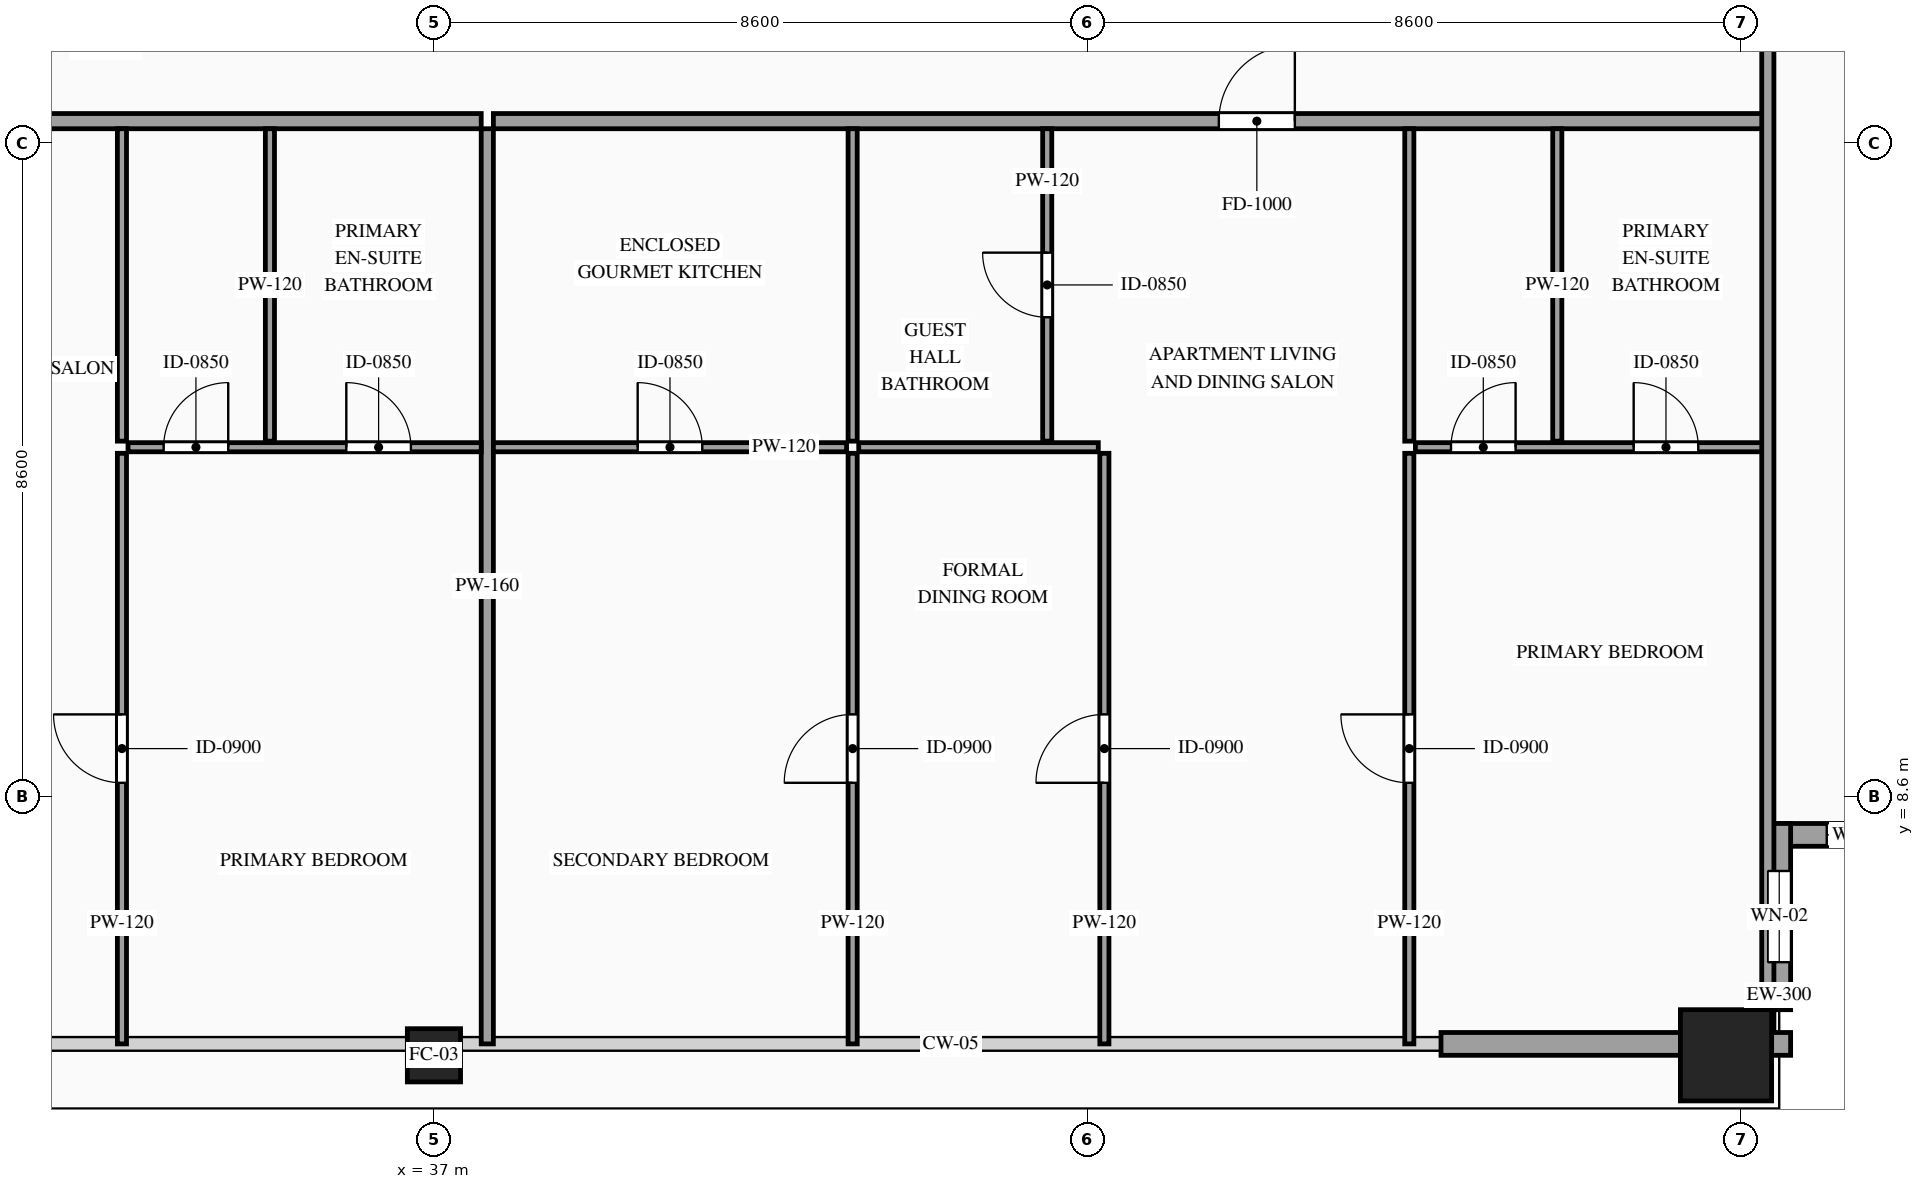
"""IFC4 building model, lengths in metres.
Left out: names, types, materials, properties, quantities, classifications, styles, units other than length and angle.
Written with IfcOpenShell. Run it as: python <this file> out.ifc"""

import sys

from ifc_helpers import new_model, si_unit, direction, frame, frame_2d, origin, origin_2d, place, context, subcontext, project, spatial, rectangle, hollow_rectangle, extrude, source, transform, mapped, element, fill, save


model = new_model("IFC4")
c1 = context("Model", 3, precision=1e-05, world=origin(), true_north=direction((0.0, 1.0)))
c2 = subcontext(c1, "Body", "Model", "MODEL_VIEW")
j1 = project(units=[si_unit("LENGTHUNIT", "METRE"), si_unit("PLANEANGLEUNIT", "RADIAN")], contexts=[c1])
p1 = place(None, origin())
s1 = spatial("IfcSite", under=j1, at=p1, CompositionType="ELEMENT")
p2 = place(p1, origin())
s2 = spatial("IfcBuilding", under=s1, at=p2, CompositionType="ELEMENT")
p3 = place(p2, frame((0.0, 0.0, 231.1)))
s3 = spatial("IfcBuildingStorey", under=s2, at=p3, CompositionType="ELEMENT", Elevation=231.1)
m1 = source(origin(), c2, "Body", "SweptSolid", [
    extrude(hollow_rectangle(XDim=0.7, YDim=0.7, WallThickness=0.032, at=origin_2d()), origin(), (0.0, 0.0, 1.0), 3.5),
])
p4 = place(p3, frame((37.0, 5.2, 0.0), z_axis=(0.0, 0.0, 1.0), x_axis=(1.0, 0.0, 0.0)))
e1 = element("IfcColumn", 1, at=p4, inside=s3, PredefinedType="COLUMN", context=c2, shape_type="MappedRepresentation", body=[
    mapped(m1, transform((0.0, 0.0, 0.0), scale=1.0)),
])
m2 = source(origin(), c2, "Body", "SweptSolid", [
    extrude(hollow_rectangle(XDim=1.2, YDim=1.2, WallThickness=0.055, at=origin_2d()), origin(), (0.0, 0.0, 1.0), 3.5),
])
p5 = place(p3, frame((54.0, 5.2, 0.0), z_axis=(0.0, 0.0, 1.0), x_axis=(1.0, 0.0, 0.0)))
e2 = element("IfcColumn", 2, at=p5, inside=s3, PredefinedType="COLUMN", context=c2, shape_type="MappedRepresentation", body=[
    mapped(m2, transform((0.0, 0.0, 0.0), scale=1.0)),
])
p6 = place(p3, frame((54.55, 8.1, 0.0), z_axis=(0.0, 0.0, 1.0), x_axis=(1.0, 0.0, 0.0)))
e3 = element("IfcWall", 3, at=p6, inside=s3, PredefinedType="SOLIDWALL", context=c2, shape_type="SweptSolid", body=[
    extrude(rectangle(XDim=2.45, YDim=0.3, at=frame_2d((1.225, 0.0))), origin(), (0.0, 0.0, 1.0), 3.28),
])
p7 = place(p6, frame((0.775, 0.0, 0.85)))
e4 = element("IfcOpeningElement", 4, at=p7, cuts=e3, PredefinedType="OPENING", context=c2, shape_type="SweptSolid", body=[
    extrude(rectangle(XDim=0.9, YDim=1.5, at=frame_2d((0.45, 0.75))), frame((0.0, 0.165, 0.0), z_axis=(0.0, -1.0, 0.0), x_axis=(1.0, 0.0, 0.0)), (0.0, 0.0, 1.0), 0.33),
])
p8 = place(p3, frame((54.7, 5.8, 0.0), z_axis=(0.0, 0.0, 1.0), x_axis=(0.0, 1.0, 0.0)))
e5 = element("IfcWall", 5, at=p8, inside=s3, PredefinedType="SOLIDWALL", context=c2, shape_type="SweptSolid", body=[
    extrude(rectangle(XDim=2.45, YDim=0.3, at=frame_2d((1.225, 0.0))), origin(), (0.0, 0.0, 1.0), 3.28),
])
p9 = place(p8, frame((0.625, 0.0, 0.85)))
e6 = element("IfcOpeningElement", 6, at=p9, cuts=e5, PredefinedType="OPENING", context=c2, shape_type="SweptSolid", body=[
    extrude(rectangle(XDim=1.2, YDim=2.1, at=frame_2d((0.6, 1.05))), frame((0.0, 0.165, 0.0), z_axis=(0.0, -1.0, 0.0), x_axis=(1.0, 0.0, 0.0)), (0.0, 0.0, 1.0), 0.33),
])
m3 = source(origin(), c2, "Body", "SweptSolid", [
    extrude(rectangle(XDim=0.25, YDim=0.3, at=frame_2d((0.125, 0.0))), origin(), (0.0, 0.0, 1.0), 3.28),
])
p10 = place(p3, frame((54.6, 5.35, 0.0), z_axis=(0.0, 0.0, 1.0), x_axis=(1.0, 0.0, 0.0)))
e7 = element("IfcWall", 7, at=p10, inside=s3, PredefinedType="SOLIDWALL", context=c2, shape_type="MappedRepresentation", body=[
    mapped(m3, transform((0.0, 0.0, 0.0), scale=1.0)),
])
m4 = source(origin(), c2, "Body", "SweptSolid", [
    extrude(rectangle(XDim=3.15, YDim=0.3, at=frame_2d((1.575, 0.0))), origin(), (0.0, 0.0, 1.0), 2.835),
])
p11 = place(p3, frame((50.25, 5.35, 0.0), z_axis=(0.0, 0.0, 1.0), x_axis=(1.0, 0.0, 0.0)))
e8 = element("IfcWall", 8, at=p11, inside=s3, PredefinedType="SOLIDWALL", context=c2, shape_type="MappedRepresentation", body=[
    mapped(m4, transform((0.0, 0.0, 0.0), scale=1.0)),
])
p12 = place(p3, frame((19.44, 17.49, 0.0), z_axis=(0.0, 0.0, 1.0), x_axis=(1.0, 0.0, 0.0)))
e9 = element("IfcWall", 9, at=p12, inside=s3, PredefinedType="PARTITIONING", context=c2, shape_type="SweptSolid", body=[
    extrude(rectangle(XDim=18.182, YDim=0.2, at=frame_2d((9.091, 0.0))), origin(), (0.0, 0.0, 1.0), 3.28),
])
p13 = place(p12, frame((10.528, 0.0, 0.0)))
e10 = element("IfcOpeningElement", 10, at=p13, cuts=e9, PredefinedType="OPENING", context=c2, shape_type="SweptSolid", body=[
    extrude(rectangle(XDim=1.0, YDim=2.2, at=frame_2d((0.5, 1.1))), frame((0.0, 0.115, 0.0), z_axis=(0.0, -1.0, 0.0), x_axis=(1.0, 0.0, 0.0)), (0.0, 0.0, 1.0), 0.23),
])
m5 = source(origin(), c2, "Body", "SweptSolid", [
    extrude(rectangle(XDim=12.04, YDim=0.16, at=frame_2d((6.02, 0.0))), origin(), (0.0, 0.0, 1.0), 3.28),
])
p14 = place(p3, frame((37.702, 5.35, 0.0), z_axis=(0.0, 0.0, 1.0), x_axis=(0.0, 1.0, 0.0)))
e11 = element("IfcWall", 11, at=p14, inside=s3, PredefinedType="PARTITIONING", context=c2, shape_type="MappedRepresentation", body=[
    mapped(m5, transform((0.0, 0.0, 0.0), scale=1.0)),
])
m6 = source(origin(), c2, "Body", "SweptSolid", [
    extrude(rectangle(XDim=4.11, YDim=0.12, at=frame_2d((2.055, 0.0))), origin(), (0.0, 0.0, 1.0), 3.28),
])
for number, where, z_axis, x_axis in (
    (12, (34.842, 13.28, 0.0), (0.0, 0.0, 1.0), (0.0, 1.0, 0.0)),
    (13, (32.895, 13.28, 0.0), (0.0, 0.0, 1.0), (0.0, 1.0, 0.0)),
):
    element("IfcWall", number, at=place(p3, frame(where, z_axis=z_axis, x_axis=x_axis)), inside=s3, PredefinedType="PARTITIONING", context=c2, shape_type="MappedRepresentation", body=[
        mapped(m6, transform((0.0, 0.0, 0.0), scale=1.0)),
    ])
p15 = place(p3, frame((32.975, 13.2, 0.0), z_axis=(0.0, 0.0, 1.0), x_axis=(1.0, 0.0, 0.0)))
e14 = element("IfcWall", 14, at=p15, inside=s3, PredefinedType="PARTITIONING", context=c2, shape_type="SweptSolid", body=[
    extrude(rectangle(XDim=4.647, YDim=0.12, at=frame_2d((2.323, 0.0))), origin(), (0.0, 0.0, 1.0), 3.28),
])
p16 = place(p15, frame((2.872, 0.0, 0.0)))
e15 = element("IfcOpeningElement", 15, at=p16, cuts=e14, PredefinedType="OPENING", context=c2, shape_type="SweptSolid", body=[
    extrude(rectangle(XDim=0.85, YDim=2.1, at=frame_2d((0.425, 1.05))), frame((0.0, 0.075, 0.0), z_axis=(0.0, -1.0, 0.0), x_axis=(1.0, 0.0, 0.0)), (0.0, 0.0, 1.0), 0.15),
])
p17 = place(p15, frame((0.469, 0.0, 0.0)))
e16 = element("IfcOpeningElement", 16, at=p17, cuts=e14, PredefinedType="OPENING", context=c2, shape_type="SweptSolid", body=[
    extrude(rectangle(XDim=0.85, YDim=2.1, at=frame_2d((0.425, 1.05))), frame((0.0, 0.075, 0.0), z_axis=(0.0, -1.0, 0.0), x_axis=(1.0, 0.0, 0.0)), (0.0, 0.0, 1.0), 0.15),
])
p18 = place(p3, frame((32.895, 5.35, 0.0), z_axis=(0.0, 0.0, 1.0), x_axis=(0.0, 1.0, 0.0)))
e17 = element("IfcWall", 17, at=p18, inside=s3, PredefinedType="PARTITIONING", context=c2, shape_type="SweptSolid", body=[
    extrude(rectangle(XDim=7.77, YDim=0.12, at=frame_2d((3.885, 0.0))), origin(), (0.0, 0.0, 1.0), 3.28),
])
p19 = place(p18, frame((3.435, 0.0, 0.0)))
e18 = element("IfcOpeningElement", 18, at=p19, cuts=e17, PredefinedType="OPENING", context=c2, shape_type="SweptSolid", body=[
    extrude(rectangle(XDim=0.9, YDim=2.15, at=frame_2d((0.45, 1.075))), frame((0.0, 0.075, 0.0), z_axis=(0.0, -1.0, 0.0), x_axis=(1.0, 0.0, 0.0)), (0.0, 0.0, 1.0), 0.15),
])
p20 = place(p3, frame((37.782, 17.49, 0.0), z_axis=(0.0, 0.0, 1.0), x_axis=(1.0, 0.0, 0.0)))
e19 = element("IfcWall", 19, at=p20, inside=s3, PredefinedType="PARTITIONING", context=c2, shape_type="SweptSolid", body=[
    extrude(rectangle(XDim=16.778, YDim=0.2, at=frame_2d((8.389, 0.0))), origin(), (0.0, 0.0, 1.0), 3.28),
])
p21 = place(p20, frame((9.545, 0.0, 0.0)))
e20 = element("IfcOpeningElement", 20, at=p21, cuts=e19, PredefinedType="OPENING", context=c2, shape_type="SweptSolid", body=[
    extrude(rectangle(XDim=1.0, YDim=2.2, at=frame_2d((0.5, 1.1))), frame((0.0, 0.115, 0.0), z_axis=(0.0, -1.0, 0.0), x_axis=(1.0, 0.0, 0.0)), (0.0, 0.0, 1.0), 0.23),
])
p22 = place(p3, frame((37.782, 13.2, 0.0), z_axis=(0.0, 0.0, 1.0), x_axis=(1.0, 0.0, 0.0)))
e21 = element("IfcWall", 21, at=p22, inside=s3, PredefinedType="PARTITIONING", context=c2, shape_type="SweptSolid", body=[
    extrude(rectangle(XDim=4.647, YDim=0.12, at=frame_2d((2.323, 0.0))), origin(), (0.0, 0.0, 1.0), 3.28),
])
p23 = place(p22, frame((1.898, 0.0, 0.0)))
e22 = element("IfcOpeningElement", 22, at=p23, cuts=e21, PredefinedType="OPENING", context=c2, shape_type="SweptSolid", body=[
    extrude(rectangle(XDim=0.85, YDim=2.1, at=frame_2d((0.425, 1.05))), frame((0.0, 0.075, 0.0), z_axis=(0.0, -1.0, 0.0), x_axis=(1.0, 0.0, 0.0)), (0.0, 0.0, 1.0), 0.15),
])
p24 = place(p3, frame((42.509, 13.28, 0.0), z_axis=(0.0, 0.0, 1.0), x_axis=(0.0, 1.0, 0.0)))
e23 = element("IfcWall", 23, at=p24, inside=s3, PredefinedType="PARTITIONING", context=c2, shape_type="MappedRepresentation", body=[
    mapped(m6, transform((0.0, 0.0, 0.0), scale=1.0)),
])
p25 = place(p3, frame((45.069, 13.28, 0.0), z_axis=(0.0, 0.0, 1.0), x_axis=(0.0, 1.0, 0.0)))
e24 = element("IfcWall", 24, at=p25, inside=s3, PredefinedType="PARTITIONING", context=c2, shape_type="SweptSolid", body=[
    extrude(rectangle(XDim=4.11, YDim=0.12, at=frame_2d((2.055, 0.0))), origin(), (0.0, 0.0, 1.0), 3.28),
])
p26 = place(p25, frame((1.63, 0.0, 0.0)))
e25 = element("IfcOpeningElement", 25, at=p26, cuts=e24, PredefinedType="OPENING", context=c2, shape_type="SweptSolid", body=[
    extrude(rectangle(XDim=0.85, YDim=2.1, at=frame_2d((0.425, 1.05))), frame((0.0, 0.075, 0.0), z_axis=(0.0, -1.0, 0.0), x_axis=(1.0, 0.0, 0.0)), (0.0, 0.0, 1.0), 0.15),
])
for number, where, z_axis, x_axis in (
    (26, (51.78, 13.28, 0.0), (0.0, 0.0, 1.0), (0.0, 1.0, 0.0)),
    (27, (49.833, 13.28, 0.0), (0.0, 0.0, 1.0), (0.0, 1.0, 0.0)),
):
    element("IfcWall", number, at=place(p3, frame(where, z_axis=z_axis, x_axis=x_axis)), inside=s3, PredefinedType="PARTITIONING", context=c2, shape_type="MappedRepresentation", body=[
        mapped(m6, transform((0.0, 0.0, 0.0), scale=1.0)),
    ])
p27 = place(p3, frame((42.509, 5.35, 0.0), z_axis=(0.0, 0.0, 1.0), x_axis=(0.0, 1.0, 0.0)))
e28 = element("IfcWall", 28, at=p27, inside=s3, PredefinedType="PARTITIONING", context=c2, shape_type="SweptSolid", body=[
    extrude(rectangle(XDim=7.77, YDim=0.12, at=frame_2d((3.885, 0.0))), origin(), (0.0, 0.0, 1.0), 3.28),
])
p28 = place(p27, frame((3.435, 0.0, 0.0)))
e29 = element("IfcOpeningElement", 29, at=p28, cuts=e28, PredefinedType="OPENING", context=c2, shape_type="SweptSolid", body=[
    extrude(rectangle(XDim=0.9, YDim=2.15, at=frame_2d((0.45, 1.075))), frame((0.0, 0.075, 0.0), z_axis=(0.0, -1.0, 0.0), x_axis=(1.0, 0.0, 0.0)), (0.0, 0.0, 1.0), 0.15),
])
p29 = place(p3, frame((49.913, 13.2, 0.0), z_axis=(0.0, 0.0, 1.0), x_axis=(1.0, 0.0, 0.0)))
e30 = element("IfcWall", 30, at=p29, inside=s3, PredefinedType="PARTITIONING", context=c2, shape_type="SweptSolid", body=[
    extrude(rectangle(XDim=4.647, YDim=0.12, at=frame_2d((2.323, 0.0))), origin(), (0.0, 0.0, 1.0), 3.28),
])
p30 = place(p29, frame((2.872, 0.0, 0.0)))
e31 = element("IfcOpeningElement", 31, at=p30, cuts=e30, PredefinedType="OPENING", context=c2, shape_type="SweptSolid", body=[
    extrude(rectangle(XDim=0.85, YDim=2.1, at=frame_2d((0.425, 1.05))), frame((0.0, 0.075, 0.0), z_axis=(0.0, -1.0, 0.0), x_axis=(1.0, 0.0, 0.0)), (0.0, 0.0, 1.0), 0.15),
])
p31 = place(p29, frame((0.469, 0.0, 0.0)))
e32 = element("IfcOpeningElement", 32, at=p31, cuts=e30, PredefinedType="OPENING", context=c2, shape_type="SweptSolid", body=[
    extrude(rectangle(XDim=0.85, YDim=2.1, at=frame_2d((0.425, 1.05))), frame((0.0, 0.075, 0.0), z_axis=(0.0, -1.0, 0.0), x_axis=(1.0, 0.0, 0.0)), (0.0, 0.0, 1.0), 0.15),
])
p32 = place(p3, frame((49.833, 5.35, 0.0), z_axis=(0.0, 0.0, 1.0), x_axis=(0.0, 1.0, 0.0)))
e33 = element("IfcWall", 33, at=p32, inside=s3, PredefinedType="PARTITIONING", context=c2, shape_type="SweptSolid", body=[
    extrude(rectangle(XDim=7.77, YDim=0.12, at=frame_2d((3.885, 0.0))), origin(), (0.0, 0.0, 1.0), 3.28),
])
p33 = place(p32, frame((3.435, 0.0, 0.0)))
e34 = element("IfcOpeningElement", 34, at=p33, cuts=e33, PredefinedType="OPENING", context=c2, shape_type="SweptSolid", body=[
    extrude(rectangle(XDim=0.9, YDim=2.15, at=frame_2d((0.45, 1.075))), frame((0.0, 0.075, 0.0), z_axis=(0.0, -1.0, 0.0), x_axis=(1.0, 0.0, 0.0)), (0.0, 0.0, 1.0), 0.15),
])
m7 = source(origin(), c2, "Body", "SweptSolid", [
    extrude(rectangle(XDim=3.152, YDim=0.12, at=frame_2d((1.576, 0.0))), origin(), (0.0, 0.0, 1.0), 3.28),
])
p34 = place(p3, frame((42.589, 13.2, 0.0), z_axis=(0.0, 0.0, 1.0), x_axis=(1.0, 0.0, 0.0)))
e35 = element("IfcWall", 35, at=p34, inside=s3, PredefinedType="PARTITIONING", context=c2, shape_type="MappedRepresentation", body=[
    mapped(m7, transform((0.0, 0.0, 0.0), scale=1.0)),
])
p35 = place(p3, frame((45.821, 5.35, 0.0), z_axis=(0.0, 0.0, 1.0), x_axis=(0.0, 1.0, 0.0)))
e36 = element("IfcWall", 36, at=p35, inside=s3, PredefinedType="PARTITIONING", context=c2, shape_type="SweptSolid", body=[
    extrude(rectangle(XDim=7.77, YDim=0.12, at=frame_2d((3.885, 0.0))), origin(), (0.0, 0.0, 1.0), 3.28),
])
p36 = place(p35, frame((3.435, 0.0, 0.0)))
e37 = element("IfcOpeningElement", 37, at=p36, cuts=e36, PredefinedType="OPENING", context=c2, shape_type="SweptSolid", body=[
    extrude(rectangle(XDim=0.9, YDim=2.15, at=frame_2d((0.45, 1.075))), frame((0.0, 0.075, 0.0), z_axis=(0.0, -1.0, 0.0), x_axis=(1.0, 0.0, 0.0)), (0.0, 0.0, 1.0), 0.15),
])
m8 = source(origin(), c2, "Body", "SweptSolid", [
    extrude(rectangle(XDim=26.69, YDim=0.16, at=frame_2d((13.345, 0.0))), origin(), (0.0, 0.0, 1.0), 3.28),
])
p37 = place(p3, frame((54.55, 5.5, 0.0), z_axis=(0.0, 0.0, 1.0), x_axis=(0.0, 1.0, 0.0)))
e38 = element("IfcWall", 38, at=p37, inside=s3, PredefinedType="PARTITIONING", context=c2, shape_type="MappedRepresentation", body=[
    mapped(m8, transform((0.0, 0.0, 0.0), scale=1.0)),
])
m9 = source(origin(), c2, "Body", "SweptSolid", [
    extrude(rectangle(XDim=0.9, YDim=1.5, at=frame_2d((0.45, 0.75))), frame((0.0, 0.03, 0.0), z_axis=(0.0, -1.0, 0.0), x_axis=(1.0, 0.0, 0.0)), (0.0, 0.0, 1.0), 0.06),
])
p38 = place(p7, origin())
e39 = element("IfcWindow", 39, at=p38, inside=s3, PartitioningType="SINGLE_PANEL", PredefinedType="WINDOW", context=c2, shape_type="MappedRepresentation", body=[
    mapped(m9, transform((0.0, 0.0, 0.0), scale=1.0)),
])
fill(e4, e39)
m10 = source(origin(), c2, "Body", "SweptSolid", [
    extrude(rectangle(XDim=1.2, YDim=2.1, at=frame_2d((0.6, 1.05))), frame((0.0, 0.03, 0.0), z_axis=(0.0, -1.0, 0.0), x_axis=(1.0, 0.0, 0.0)), (0.0, 0.0, 1.0), 0.06),
])
p39 = place(p9, origin())
e40 = element("IfcWindow", 40, at=p39, inside=s3, PartitioningType="SINGLE_PANEL", PredefinedType="WINDOW", context=c2, shape_type="MappedRepresentation", body=[
    mapped(m10, transform((0.0, 0.0, 0.0), scale=1.0)),
])
fill(e6, e40)
m11 = source(origin(), c2, "Body", "SweptSolid", [
    extrude(rectangle(XDim=0.85, YDim=2.1, at=frame_2d((0.425, 1.05))), frame((0.0, 0.025, 0.0), z_axis=(0.0, -1.0, 0.0), x_axis=(1.0, 0.0, 0.0)), (0.0, 0.0, 1.0), 0.05),
])
p40 = place(p16, origin())
e41 = element("IfcDoor", 41, at=p40, inside=s3, OperationType="SINGLE_SWING_LEFT", PredefinedType="DOOR", context=c2, shape_type="MappedRepresentation", body=[
    mapped(m11, transform((0.0, 0.0, 0.0), scale=1.0)),
])
fill(e15, e41)
p41 = place(p17, origin())
e42 = element("IfcDoor", 42, at=p41, inside=s3, OperationType="SINGLE_SWING_RIGHT", PredefinedType="DOOR", context=c2, shape_type="MappedRepresentation", body=[
    mapped(m11, transform((0.0, 0.0, 0.0), scale=1.0)),
])
fill(e16, e42)
m12 = source(origin(), c2, "Body", "SweptSolid", [
    extrude(rectangle(XDim=0.9, YDim=2.15, at=frame_2d((0.45, 1.075))), frame((0.0, 0.025, 0.0), z_axis=(0.0, -1.0, 0.0), x_axis=(1.0, 0.0, 0.0)), (0.0, 0.0, 1.0), 0.05),
])
p42 = place(p19, origin())
e43 = element("IfcDoor", 43, at=p42, inside=s3, OperationType="SINGLE_SWING_RIGHT", PredefinedType="DOOR", context=c2, shape_type="MappedRepresentation", body=[
    mapped(m12, transform((0.0, 0.0, 0.0), scale=1.0)),
])
fill(e18, e43)
m13 = source(origin(), c2, "Body", "SweptSolid", [
    extrude(rectangle(XDim=1.0, YDim=2.2, at=frame_2d((0.5, 1.1))), frame((0.0, 0.025, 0.0), z_axis=(0.0, -1.0, 0.0), x_axis=(1.0, 0.0, 0.0)), (0.0, 0.0, 1.0), 0.05),
])
p43 = place(p21, origin())
e44 = element("IfcDoor", 44, at=p43, inside=s3, OperationType="SINGLE_SWING_RIGHT", PredefinedType="DOOR", context=c2, shape_type="MappedRepresentation", body=[
    mapped(m13, transform((0.0, 0.0, 0.0), scale=1.0)),
])
fill(e20, e44)
p44 = place(p23, origin())
e45 = element("IfcDoor", 45, at=p44, inside=s3, OperationType="SINGLE_SWING_LEFT", PredefinedType="DOOR", context=c2, shape_type="MappedRepresentation", body=[
    mapped(m11, transform((0.0, 0.0, 0.0), scale=1.0)),
])
fill(e22, e45)
p45 = place(p26, origin())
e46 = element("IfcDoor", 46, at=p45, inside=s3, OperationType="SINGLE_SWING_RIGHT", PredefinedType="DOOR", context=c2, shape_type="MappedRepresentation", body=[
    mapped(m11, transform((0.0, 0.0, 0.0), scale=1.0)),
])
fill(e25, e46)
p46 = place(p30, origin())
e47 = element("IfcDoor", 47, at=p46, inside=s3, OperationType="SINGLE_SWING_LEFT", PredefinedType="DOOR", context=c2, shape_type="MappedRepresentation", body=[
    mapped(m11, transform((0.0, 0.0, 0.0), scale=1.0)),
])
fill(e31, e47)
p47 = place(p31, origin())
e48 = element("IfcDoor", 48, at=p47, inside=s3, OperationType="SINGLE_SWING_RIGHT", PredefinedType="DOOR", context=c2, shape_type="MappedRepresentation", body=[
    mapped(m11, transform((0.0, 0.0, 0.0), scale=1.0)),
])
fill(e32, e48)
p48 = place(p28, origin())
e49 = element("IfcDoor", 49, at=p48, inside=s3, OperationType="SINGLE_SWING_LEFT", PredefinedType="DOOR", context=c2, shape_type="MappedRepresentation", body=[
    mapped(m12, transform((0.0, 0.0, 0.0), scale=1.0)),
])
fill(e29, e49)
p49 = place(p33, origin())
e50 = element("IfcDoor", 50, at=p49, inside=s3, OperationType="SINGLE_SWING_RIGHT", PredefinedType="DOOR", context=c2, shape_type="MappedRepresentation", body=[
    mapped(m12, transform((0.0, 0.0, 0.0), scale=1.0)),
])
fill(e34, e50)
p50 = place(p36, origin())
e51 = element("IfcDoor", 51, at=p50, inside=s3, OperationType="SINGLE_SWING_LEFT", PredefinedType="DOOR", context=c2, shape_type="MappedRepresentation", body=[
    mapped(m12, transform((0.0, 0.0, 0.0), scale=1.0)),
])
fill(e37, e51)
save(model, sys.argv[1])
